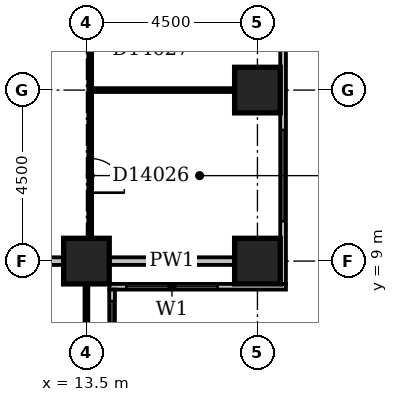
"""IFC4 building model, lengths in metres.
Left out: names, types, materials, properties, quantities, classifications, styles, units other than length and angle.
Written with IfcOpenShell. Run it as: python <this file> out.ifc"""

import sys

from ifc_helpers import new_model, si_unit, direction, frame, frame_2d, origin, origin_2d, place, context, subcontext, project, spatial, rectangle, extrude, element, fill, save


model = new_model("IFC4")
c1 = context("Model", 3, precision=1e-05, world=origin(), true_north=direction((0.0, 1.0)))
c2 = subcontext(c1, "Body", "Model", "MODEL_VIEW")
j1 = project(units=[si_unit("LENGTHUNIT", "METRE"), si_unit("PLANEANGLEUNIT", "RADIAN")], contexts=[c1])
p1 = place(None, origin())
s1 = spatial("IfcSite", under=j1, at=p1, CompositionType="ELEMENT")
p2 = place(p1, origin())
s2 = spatial("IfcBuilding", under=s1, at=p2, CompositionType="ELEMENT")
p3 = place(p2, frame((0.0, 0.0, 61.4)))
s3 = spatial("IfcBuildingStorey", under=s2, at=p3, CompositionType="ELEMENT", Elevation=61.4)
for number, where, z_axis, x_axis in (
    (1, (13.5, 9.0, -0.3), (0.0, 0.0, 1.0), (1.0, 0.0, 0.0)),
    (2, (18.0, 9.0, -0.3), (0.0, 0.0, 1.0), (1.0, 0.0, 0.0)),
    (3, (18.0, 13.5, -0.3), (0.0, 0.0, 1.0), (1.0, 0.0, 0.0)),
):
    element("IfcColumn", number, at=place(p3, frame(where, z_axis=z_axis, x_axis=x_axis)), inside=s3, PredefinedType="COLUMN", context=c2, shape_type="SweptSolid", body=[
        extrude(rectangle(XDim=1.2, YDim=1.2, at=origin_2d()), origin(), (0.0, 0.0, 1.0), 3.6),
    ])
p4 = place(p3, frame((14.175, 3.9, 0.0), z_axis=(0.0, 0.0, 1.0), x_axis=(0.0, 1.0, 0.0)))
e4 = element("IfcWall", 4, at=p4, inside=s3, PredefinedType="STANDARD", context=c2, shape_type="SweptSolid", body=[
    extrude(rectangle(XDim=4.35, YDim=0.15, at=frame_2d((2.175, 0.0))), origin(), (0.0, 0.0, 1.0), 2.7),
])
p5 = place(p4, frame((1.65, 0.0, 0.6)))
e5 = element("IfcOpeningElement", 5, at=p5, cuts=e4, PredefinedType="OPENING", context=c2, shape_type="SweptSolid", body=[
    extrude(rectangle(XDim=2.4, YDim=1.8, at=frame_2d((1.2, 0.9))), frame((0.0, 0.087, 0.0), z_axis=(0.0, -1.0, 0.0), x_axis=(1.0, 0.0, 0.0)), (0.0, 0.0, 1.0), 0.174),
])
p6 = place(p3, frame((14.1, 8.325, 0.0), z_axis=(0.0, 0.0, 1.0), x_axis=(1.0, 0.0, 0.0)))
e6 = element("IfcWall", 6, at=p6, inside=s3, PredefinedType="STANDARD", context=c2, shape_type="SweptSolid", body=[
    extrude(rectangle(XDim=4.65, YDim=0.15, at=frame_2d((2.325, 0.0))), origin(), (0.0, 0.0, 1.0), 2.7),
])
p7 = place(p6, frame((0.45, 0.0, 0.6)))
e7 = element("IfcOpeningElement", 7, at=p7, cuts=e6, PredefinedType="OPENING", context=c2, shape_type="SweptSolid", body=[
    extrude(rectangle(XDim=2.4, YDim=1.8, at=frame_2d((1.2, 0.9))), frame((0.0, 0.087, 0.0), z_axis=(0.0, -1.0, 0.0), x_axis=(1.0, 0.0, 0.0)), (0.0, 0.0, 1.0), 0.174),
])
p8 = place(p3, frame((18.675, 8.4, 0.0), z_axis=(0.0, 0.0, 1.0), x_axis=(0.0, 1.0, 0.0)))
e8 = element("IfcWall", 8, at=p8, inside=s3, PredefinedType="STANDARD", context=c2, shape_type="SweptSolid", body=[
    extrude(rectangle(XDim=8.85, YDim=0.15, at=frame_2d((4.425, 0.0))), origin(), (0.0, 0.0, 1.0), 2.7),
])
p9 = place(p8, frame((1.65, 0.0, 0.6)))
e9 = element("IfcOpeningElement", 9, at=p9, cuts=e8, PredefinedType="OPENING", context=c2, shape_type="SweptSolid", body=[
    extrude(rectangle(XDim=2.4, YDim=1.8, at=frame_2d((1.2, 0.9))), frame((0.0, 0.087, 0.0), z_axis=(0.0, -1.0, 0.0), x_axis=(1.0, 0.0, 0.0)), (0.0, 0.0, 1.0), 0.174),
])
p10 = place(p8, frame((6.15, 0.0, 0.6)))
e10 = element("IfcOpeningElement", 10, at=p10, cuts=e8, PredefinedType="OPENING", context=c2, shape_type="SweptSolid", body=[
    extrude(rectangle(XDim=2.4, YDim=1.8, at=frame_2d((1.2, 0.9))), frame((0.0, 0.087, 0.0), z_axis=(0.0, -1.0, 0.0), x_axis=(1.0, 0.0, 0.0)), (0.0, 0.0, 1.0), 0.174),
])
p11 = place(p3, frame((13.5, 5.1, 0.0), z_axis=(0.0, 0.0, 1.0), x_axis=(0.0, 1.0, 0.0)))
e11 = element("IfcWall", 11, at=p11, inside=s3, PredefinedType="PARTITIONING", context=c2, shape_type="SweptSolid", body=[
    extrude(rectangle(XDim=3.3, YDim=0.1, at=frame_2d((1.65, 0.0))), origin(), (0.0, 0.0, 1.0), 2.7),
])
p12 = place(p3, frame((9.1, 9.0, 0.0), z_axis=(0.0, 0.0, 1.0), x_axis=(1.0, 0.0, 0.0)))
e12 = element("IfcWall", 12, at=p12, inside=s3, PredefinedType="PARTITIONING", context=c2, shape_type="SweptSolid", body=[
    extrude(rectangle(XDim=3.8, YDim=0.2, at=frame_2d((1.9, 0.0))), origin(), (0.0, 0.0, 1.0), 3.3),
])
p13 = place(p3, frame((14.1, 9.0, 0.0), z_axis=(0.0, 0.0, 1.0), x_axis=(1.0, 0.0, 0.0)))
e13 = element("IfcWall", 13, at=p13, inside=s3, PredefinedType="PARTITIONING", context=c2, shape_type="SweptSolid", body=[
    extrude(rectangle(XDim=3.3, YDim=0.2, at=frame_2d((1.65, 0.0))), origin(), (0.0, 0.0, 1.0), 2.7),
])
p14 = place(p3, frame((13.6, 9.6, 0.0), z_axis=(0.0, 0.0, 1.0), x_axis=(0.0, 1.0, 0.0)))
e14 = element("IfcWall", 14, at=p14, inside=s3, PredefinedType="PARTITIONING", context=c2, shape_type="SweptSolid", body=[
    extrude(rectangle(XDim=8.3, YDim=0.1, at=frame_2d((4.15, 0.0))), origin(), (0.0, 0.0, 1.0), 3.3),
])
p15 = place(p14, frame((1.2, 0.0, 0.0)))
e15 = element("IfcOpeningElement", 15, at=p15, cuts=e14, PredefinedType="OPENING", context=c2, shape_type="SweptSolid", body=[
    extrude(rectangle(XDim=0.9, YDim=2.1, at=frame_2d((0.45, 1.05))), frame((0.0, 0.062, 0.0), z_axis=(0.0, -1.0, 0.0), x_axis=(1.0, 0.0, 0.0)), (0.0, 0.0, 1.0), 0.124),
])
p16 = place(p14, frame((5.7, 0.0, 0.0)))
e16 = element("IfcOpeningElement", 16, at=p16, cuts=e14, PredefinedType="OPENING", context=c2, shape_type="SweptSolid", body=[
    extrude(rectangle(XDim=0.9, YDim=2.1, at=frame_2d((0.45, 1.05))), frame((0.0, 0.062, 0.0), z_axis=(0.0, -1.0, 0.0), x_axis=(1.0, 0.0, 0.0)), (0.0, 0.0, 1.0), 0.124),
])
p17 = place(p3, frame((13.65, 13.5, 0.0), z_axis=(0.0, 0.0, 1.0), x_axis=(1.0, 0.0, 0.0)))
e17 = element("IfcWall", 17, at=p17, inside=s3, PredefinedType="PARTITIONING", context=c2, shape_type="SweptSolid", body=[
    extrude(rectangle(XDim=3.75, YDim=0.1, at=frame_2d((1.875, 0.0))), origin(), (0.0, 0.0, 1.0), 3.3),
])
p18 = place(p5, origin())
e18 = element("IfcWindow", 18, at=p18, inside=s3, PartitioningType="SINGLE_PANEL", PredefinedType="WINDOW", context=c2, shape_type="SweptSolid", body=[
    extrude(rectangle(XDim=2.4, YDim=1.8, at=frame_2d((1.2, 0.9))), frame((0.0, 0.03, 0.0), z_axis=(0.0, -1.0, 0.0), x_axis=(1.0, 0.0, 0.0)), (0.0, 0.0, 1.0), 0.06),
])
fill(e5, e18)
p19 = place(p7, origin())
e19 = element("IfcWindow", 19, at=p19, inside=s3, PartitioningType="SINGLE_PANEL", PredefinedType="WINDOW", context=c2, shape_type="SweptSolid", body=[
    extrude(rectangle(XDim=2.4, YDim=1.8, at=frame_2d((1.2, 0.9))), frame((0.0, 0.03, 0.0), z_axis=(0.0, -1.0, 0.0), x_axis=(1.0, 0.0, 0.0)), (0.0, 0.0, 1.0), 0.06),
])
fill(e7, e19)
p20 = place(p9, origin())
e20 = element("IfcWindow", 20, at=p20, inside=s3, PartitioningType="SINGLE_PANEL", PredefinedType="WINDOW", context=c2, shape_type="SweptSolid", body=[
    extrude(rectangle(XDim=2.4, YDim=1.8, at=frame_2d((1.2, 0.9))), frame((0.0, 0.03, 0.0), z_axis=(0.0, -1.0, 0.0), x_axis=(1.0, 0.0, 0.0)), (0.0, 0.0, 1.0), 0.06),
])
fill(e9, e20)
p21 = place(p15, frame((0.9, 0.0, 0.0), z_axis=(0.0, 0.0, 1.0), x_axis=(-1.0, 0.0, 0.0)))
e21 = element("IfcDoor", 21, at=p21, inside=s3, OperationType="SINGLE_SWING_RIGHT", PredefinedType="DOOR", context=c2, shape_type="SweptSolid", body=[
    extrude(rectangle(XDim=0.9, YDim=2.1, at=frame_2d((0.45, 1.05))), frame((0.0, 0.025, 0.0), z_axis=(0.0, -1.0, 0.0), x_axis=(1.0, 0.0, 0.0)), (0.0, 0.0, 1.0), 0.05),
])
fill(e15, e21)
save(model, sys.argv[1])
